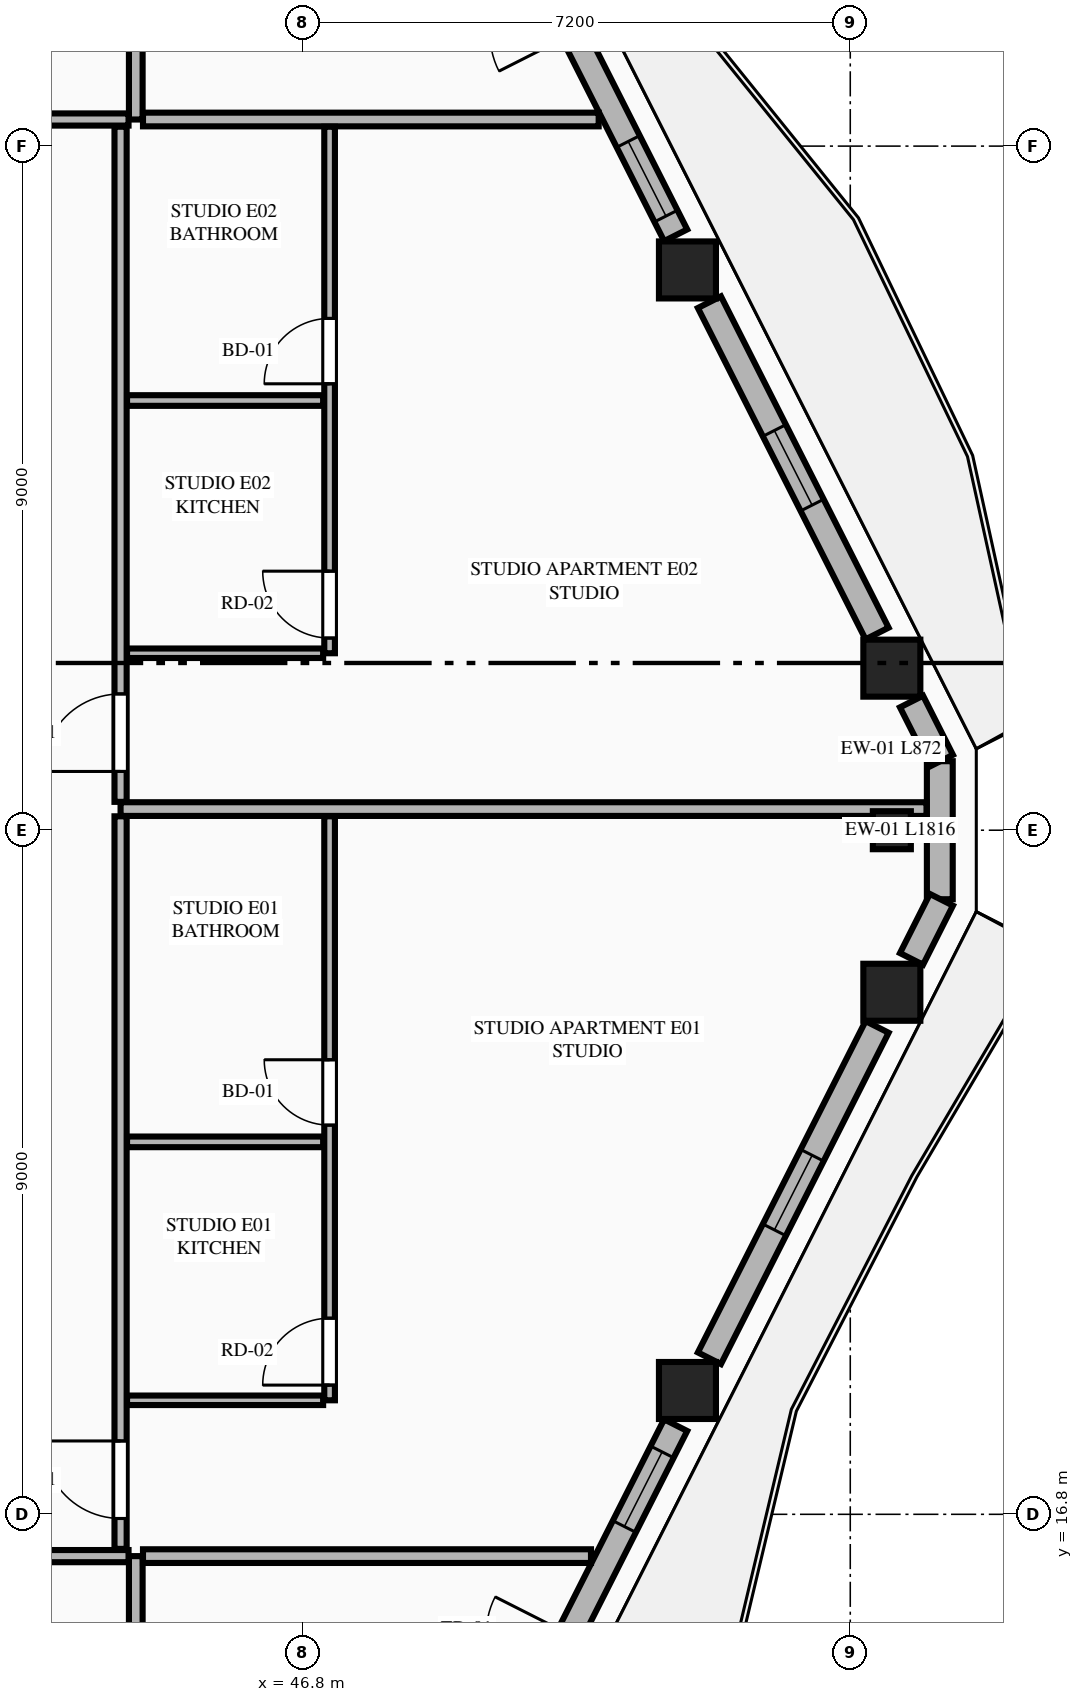
"""IFC4 building model, lengths in metres.
Left out: names, types, materials, properties, quantities, classifications, styles, units other than length and angle.
Written with IfcOpenShell. Run it as: python <this file> out.ifc"""

import sys

from ifc_helpers import new_model, si_unit, direction, frame, frame_2d, origin, origin_2d, place, context, subcontext, project, spatial, rectangle, extrude, element, fill, save


model = new_model("IFC4")
c1 = context("Model", 3, precision=1e-05, world=origin(), true_north=direction((0.0, 1.0)))
c2 = subcontext(c1, "Body", "Model", "MODEL_VIEW")
j1 = project(units=[si_unit("LENGTHUNIT", "METRE"), si_unit("PLANEANGLEUNIT", "RADIAN")], contexts=[c1])
p1 = place(None, origin())
s1 = spatial("IfcSite", under=j1, at=p1, CompositionType="ELEMENT")
p2 = place(p1, origin())
s2 = spatial("IfcBuilding", under=s1, at=p2, CompositionType="ELEMENT")
p3 = place(p2, frame((0.0, 0.0, 214.5)))
s3 = spatial("IfcBuildingStorey", under=s2, at=p3, CompositionType="ELEMENT", Elevation=214.5)
for number, where, z_axis, x_axis in (
    (1, (51.858, 18.429, 0.0), (0.0, 0.0, 1.0), (1.0, 0.0, 0.0)),
    (2, (54.547, 23.668, 0.0), (0.0, 0.0, 1.0), (1.0, 0.0, 0.0)),
    (3, (54.547, 27.932, 0.0), (0.0, 0.0, 1.0), (1.0, 0.0, 0.0)),
    (4, (51.858, 33.171, 0.0), (0.0, 0.0, 1.0), (1.0, 0.0, 0.0)),
):
    element("IfcColumn", number, at=place(p3, frame(where, z_axis=z_axis, x_axis=x_axis)), inside=s3, PredefinedType="COLUMN", context=c2, shape_type="SweptSolid", body=[
        extrude(rectangle(XDim=0.75, YDim=0.75, at=origin_2d()), origin(), (0.0, 0.0, 1.0), 3.55),
    ])
p4 = place(p3, frame((54.547, 25.8, 0.0), z_axis=(0.0, 0.0, 1.0), x_axis=(0.0, 1.0, 0.0)))
e5 = element("IfcColumn", 5, at=p4, inside=s3, PredefinedType="PILASTER", context=c2, shape_type="SweptSolid", body=[
    extrude(rectangle(XDim=0.5, YDim=0.35, at=origin_2d()), origin(), (0.0, 0.0, 1.0), 3.55),
])
p5 = place(p3, frame((55.178, 24.892, 0.0), z_axis=(0.0, 0.0, 1.0), x_axis=(0.0, 1.0, 0.0)))
e6 = element("IfcWall", 6, at=p5, inside=s3, PredefinedType="STANDARD", context=c2, shape_type="SweptSolid", body=[
    extrude(rectangle(XDim=1.816, YDim=0.34, at=frame_2d((0.908, 0.0))), origin(), (0.0, 0.0, 1.0), 3.35),
])
p6 = place(p3, frame((49.403, 13.427, 0.0), z_axis=(0.0, 0.0, 1.0), x_axis=(0.451425765525, 0.892308678777, 0.0)))
e7 = element("IfcWall", 7, at=p6, inside=s3, PredefinedType="STANDARD", context=c2, shape_type="SweptSolid", body=[
    extrude(rectangle(XDim=5.094, YDim=0.34, at=frame_2d((2.547, 0.0))), origin(), (0.0, 0.0, 1.0), 2.883),
])
p7 = place(p6, frame((0.907, 0.0, 0.0)))
e8 = element("IfcOpeningElement", 8, at=p7, cuts=e7, PredefinedType="OPENING", context=c2, shape_type="SweptSolid", body=[
    extrude(rectangle(XDim=1.1, YDim=2.25, at=frame_2d((0.55, 1.125))), frame((0.0, 0.18, 0.0), z_axis=(0.0, -1.0, 0.0), x_axis=(1.0, 0.0, 0.0)), (0.0, 0.0, 1.0), 0.36),
])
p8 = place(p6, frame((3.6, 0.0, 0.75)))
e9 = element("IfcOpeningElement", 9, at=p8, cuts=e7, PredefinedType="OPENING", context=c2, shape_type="SweptSolid", body=[
    extrude(rectangle(XDim=1.1, YDim=1.983, at=frame_2d((0.55, 0.991))), frame((0.0, 0.18, 0.0), z_axis=(0.0, -1.0, 0.0), x_axis=(1.0, 0.0, 0.0)), (0.0, 0.0, 1.0), 0.36),
])
p9 = place(p3, frame((52.147, 18.853, 0.0), z_axis=(0.0, 0.0, 1.0), x_axis=(0.451566029745, 0.892237704191, 0.0)))
e10 = element("IfcWall", 10, at=p9, inside=s3, PredefinedType="STANDARD", context=c2, shape_type="SweptSolid", body=[
    extrude(rectangle(XDim=4.885, YDim=0.34, at=frame_2d((2.443, 0.0))), origin(), (0.0, 0.0, 1.0), 2.883),
])
p10 = place(p9, frame((1.893, 0.0, 0.75)))
e11 = element("IfcOpeningElement", 11, at=p10, cuts=e10, PredefinedType="OPENING", context=c2, shape_type="SweptSolid", body=[
    extrude(rectangle(XDim=1.1, YDim=1.983, at=frame_2d((0.55, 0.991))), frame((0.0, 0.18, 0.0), z_axis=(0.0, -1.0, 0.0), x_axis=(1.0, 0.0, 0.0)), (0.0, 0.0, 1.0), 0.36),
])
p11 = place(p3, frame((54.806, 24.107, 0.0), z_axis=(0.0, 0.0, 1.0), x_axis=(0.450906649871, 0.892571113751, 0.0)))
e12 = element("IfcWall", 12, at=p11, inside=s3, PredefinedType="STANDARD", context=c2, shape_type="SweptSolid", body=[
    extrude(rectangle(XDim=0.872, YDim=0.34, at=frame_2d((0.436, 0.0))), origin(), (0.0, 0.0, 1.0), 3.35),
])
p12 = place(p3, frame((55.199, 26.715, 0.0), z_axis=(0.0, 0.0, 1.0), x_axis=(-0.451019391667, 0.892514150218, 0.0)))
e13 = element("IfcWall", 13, at=p12, inside=s3, PredefinedType="STANDARD", context=c2, shape_type="SweptSolid", body=[
    extrude(rectangle(XDim=0.872, YDim=0.34, at=frame_2d((0.436, 0.0))), origin(), (0.0, 0.0, 1.0), 3.35),
])
p13 = place(p3, frame((54.353, 28.388, 0.0), z_axis=(0.0, 0.0, 1.0), x_axis=(-0.451545895749, 0.892247893824, 0.0)))
e14 = element("IfcWall", 14, at=p13, inside=s3, PredefinedType="STANDARD", context=c2, shape_type="SweptSolid", body=[
    extrude(rectangle(XDim=4.885, YDim=0.34, at=frame_2d((2.443, 0.0))), origin(), (0.0, 0.0, 1.0), 2.883),
])
p14 = place(p13, frame((1.893, 0.0, 0.75)))
e15 = element("IfcOpeningElement", 15, at=p14, cuts=e14, PredefinedType="OPENING", context=c2, shape_type="SweptSolid", body=[
    extrude(rectangle(XDim=1.1, YDim=1.983, at=frame_2d((0.55, 0.991))), frame((0.0, 0.18, 0.0), z_axis=(0.0, -1.0, 0.0), x_axis=(1.0, 0.0, 0.0)), (0.0, 0.0, 1.0), 0.36),
])
p15 = place(p3, frame((51.703, 33.627, 0.0), z_axis=(0.0, 0.0, 1.0), x_axis=(-0.451406462707, 0.892318443957, 0.0)))
e16 = element("IfcWall", 16, at=p15, inside=s3, PredefinedType="STANDARD", context=c2, shape_type="SweptSolid", body=[
    extrude(rectangle(XDim=5.095, YDim=0.34, at=frame_2d((2.547, 0.0))), origin(), (0.0, 0.0, 1.0), 2.883),
])
p16 = place(p15, frame((2.976, 0.0, 0.0)))
e17 = element("IfcOpeningElement", 17, at=p16, cuts=e16, PredefinedType="OPENING", context=c2, shape_type="SweptSolid", body=[
    extrude(rectangle(XDim=1.1, YDim=2.25, at=frame_2d((0.55, 1.125))), frame((0.0, 0.18, 0.0), z_axis=(0.0, -1.0, 0.0), x_axis=(1.0, 0.0, 0.0)), (0.0, 0.0, 1.0), 0.36),
])
p17 = place(p15, frame((0.283, 0.0, 0.75)))
e18 = element("IfcOpeningElement", 18, at=p17, cuts=e16, PredefinedType="OPENING", context=c2, shape_type="SweptSolid", body=[
    extrude(rectangle(XDim=1.1, YDim=1.983, at=frame_2d((0.55, 0.991))), frame((0.0, 0.18, 0.0), z_axis=(0.0, -1.0, 0.0), x_axis=(1.0, 0.0, 0.0)), (0.0, 0.0, 1.0), 0.36),
])
p18 = place(p3, frame((44.6, 5.968, 0.0), z_axis=(0.0, 0.0, 1.0), x_axis=(0.0, 1.0, 0.0)))
e19 = element("IfcWall", 19, at=p18, inside=s3, PredefinedType="PARTITIONING", context=c2, shape_type="SweptSolid", body=[
    extrude(rectangle(XDim=10.282, YDim=0.18, at=frame_2d((5.141, 0.0))), origin(), (0.0, 0.0, 1.0), 3.35),
])
p19 = place(p3, frame((20.295, 16.25, 0.0), z_axis=(0.0, 0.0, 1.0), x_axis=(1.0, 0.0, 0.0)))
e20 = element("IfcWall", 20, at=p19, inside=s3, PredefinedType="PARTITIONING", context=c2, shape_type="SweptSolid", body=[
    extrude(rectangle(XDim=24.21, YDim=0.16, at=frame_2d((12.105, 0.0))), origin(), (0.0, 0.0, 1.0), 3.35),
])
p20 = place(p19, frame((0.705, 0.0, 0.0)))
e21 = element("IfcOpeningElement", 21, at=p20, cuts=e20, PredefinedType="OPENING", context=c2, shape_type="SweptSolid", body=[
    extrude(rectangle(XDim=1.02, YDim=2.25, at=frame_2d((0.51, 1.125))), frame((0.0, 0.09, 0.0), z_axis=(0.0, -1.0, 0.0), x_axis=(1.0, 0.0, 0.0)), (0.0, 0.0, 1.0), 0.18),
])
p21 = place(p3, frame((44.6, 35.15, 0.0), z_axis=(0.0, 0.0, 1.0), x_axis=(0.0, 1.0, 0.0)))
e22 = element("IfcWall", 22, at=p21, inside=s3, PredefinedType="PARTITIONING", context=c2, shape_type="SweptSolid", body=[
    extrude(rectangle(XDim=10.482, YDim=0.18, at=frame_2d((5.241, 0.0))), origin(), (0.0, 0.0, 1.0), 3.35),
])
p22 = place(p3, frame((20.295, 35.15, 0.0), z_axis=(0.0, 0.0, 1.0), x_axis=(1.0, 0.0, 0.0)))
e23 = element("IfcWall", 23, at=p22, inside=s3, PredefinedType="PARTITIONING", context=c2, shape_type="SweptSolid", body=[
    extrude(rectangle(XDim=24.21, YDim=0.16, at=frame_2d((12.105, 0.0))), origin(), (0.0, 0.0, 1.0), 3.35),
])
p23 = place(p22, frame((0.405, 0.0, 0.0)))
e24 = element("IfcOpeningElement", 24, at=p23, cuts=e23, PredefinedType="OPENING", context=c2, shape_type="SweptSolid", body=[
    extrude(rectangle(XDim=1.35, YDim=2.35, at=frame_2d((0.675, 1.175))), frame((0.0, 0.09, 0.0), z_axis=(0.0, -1.0, 0.0), x_axis=(1.0, 0.0, 0.0)), (0.0, 0.0, 1.0), 0.18),
])
p24 = place(p3, frame((44.695, 16.25, 0.0), z_axis=(0.0, 0.0, 1.0), x_axis=(1.0, 0.0, 0.0)))
e25 = element("IfcWall", 25, at=p24, inside=s3, PredefinedType="PARTITIONING", context=c2, shape_type="SweptSolid", body=[
    extrude(rectangle(XDim=5.894, YDim=0.18, at=frame_2d((2.947, 0.0))), origin(), (0.0, 0.0, 1.0), 3.35),
])
p25 = place(p3, frame((44.695, 35.15, 0.0), z_axis=(0.0, 0.0, 1.0), x_axis=(1.0, 0.0, 0.0)))
e26 = element("IfcWall", 26, at=p25, inside=s3, PredefinedType="PARTITIONING", context=c2, shape_type="SweptSolid", body=[
    extrude(rectangle(XDim=5.995, YDim=0.18, at=frame_2d((2.998, 0.0))), origin(), (0.0, 0.0, 1.0), 3.35),
])
p26 = place(p3, frame((44.4, 16.345, 0.0), z_axis=(0.0, 0.0, 1.0), x_axis=(0.0, 1.0, 0.0)))
e27 = element("IfcWall", 27, at=p26, inside=s3, PredefinedType="PARTITIONING", context=c2, shape_type="SweptSolid", body=[
    extrude(rectangle(XDim=9.638, YDim=0.16, at=frame_2d((4.819, 0.0))), origin(), (0.0, 0.0, 1.0), 3.35),
])
p27 = place(p26, frame((0.4, 0.0, 0.0)))
e28 = element("IfcOpeningElement", 28, at=p27, cuts=e27, PredefinedType="OPENING", context=c2, shape_type="SweptSolid", body=[
    extrude(rectangle(XDim=1.02, YDim=2.25, at=frame_2d((0.51, 1.125))), frame((0.0, 0.09, 0.0), z_axis=(0.0, -1.0, 0.0), x_axis=(1.0, 0.0, 0.0)), (0.0, 0.0, 1.0), 0.18),
])
p28 = place(p3, frame((44.485, 18.3, 0.0), z_axis=(0.0, 0.0, 1.0), x_axis=(1.0, 0.0, 0.0)))
e29 = element("IfcWall", 29, at=p28, inside=s3, PredefinedType="PARTITIONING", context=c2, shape_type="SweptSolid", body=[
    extrude(rectangle(XDim=2.58, YDim=0.125, at=frame_2d((1.29, 0.0))), origin(), (0.0, 0.0, 1.0), 2.807),
])
p29 = place(p3, frame((47.15, 18.3, 0.0), z_axis=(0.0, 0.0, 1.0), x_axis=(0.0, 1.0, 0.0)))
e30 = element("IfcWall", 30, at=p29, inside=s3, PredefinedType="PLUMBINGWALL", context=c2, shape_type="SweptSolid", body=[
    extrude(rectangle(XDim=7.683, YDim=0.14, at=frame_2d((3.841, 0.0))), origin(), (0.0, 0.0, 1.0), 3.35),
])
p30 = place(p29, frame((3.62, 0.0, 0.0)))
e31 = element("IfcOpeningElement", 31, at=p30, cuts=e30, PredefinedType="OPENING", context=c2, shape_type="SweptSolid", body=[
    extrude(rectangle(XDim=0.86, YDim=2.1, at=frame_2d((0.43, 1.05))), frame((0.0, 0.08, 0.0), z_axis=(0.0, -1.0, 0.0), x_axis=(1.0, 0.0, 0.0)), (0.0, 0.0, 1.0), 0.16),
])
p31 = place(p29, frame((0.2, 0.0, 0.0)))
e32 = element("IfcOpeningElement", 32, at=p31, cuts=e30, PredefinedType="OPENING", context=c2, shape_type="SweptSolid", body=[
    extrude(rectangle(XDim=0.88, YDim=2.15, at=frame_2d((0.44, 1.075))), frame((0.0, 0.08, 0.0), z_axis=(0.0, -1.0, 0.0), x_axis=(1.0, 0.0, 0.0)), (0.0, 0.0, 1.0), 0.16),
])
p32 = place(p3, frame((44.485, 21.7, 0.0), z_axis=(0.0, 0.0, 1.0), x_axis=(1.0, 0.0, 0.0)))
e33 = element("IfcWall", 33, at=p32, inside=s3, PredefinedType="PLUMBINGWALL", context=c2, shape_type="SweptSolid", body=[
    extrude(rectangle(XDim=2.58, YDim=0.14, at=frame_2d((1.29, 0.0))), origin(), (0.0, 0.0, 1.0), 3.35),
])
p33 = place(p3, frame((44.4, 26.078, 0.0), z_axis=(0.0, 0.0, 1.0), x_axis=(1.0, 0.0, 0.0)))
e34 = element("IfcWall", 34, at=p33, inside=s3, PredefinedType="PARTITIONING", context=c2, shape_type="SweptSolid", body=[
    extrude(rectangle(XDim=10.603, YDim=0.18, at=frame_2d((5.302, 0.0))), origin(), (0.0, 0.0, 1.0), 3.35),
])
p34 = place(p3, frame((44.4, 26.173, 0.0), z_axis=(0.0, 0.0, 1.0), x_axis=(0.0, 1.0, 0.0)))
e35 = element("IfcWall", 35, at=p34, inside=s3, PredefinedType="PARTITIONING", context=c2, shape_type="SweptSolid", body=[
    extrude(rectangle(XDim=8.882, YDim=0.16, at=frame_2d((4.441, 0.0))), origin(), (0.0, 0.0, 1.0), 3.35),
])
p35 = place(p34, frame((0.4, 0.0, 0.0)))
e36 = element("IfcOpeningElement", 36, at=p35, cuts=e35, PredefinedType="OPENING", context=c2, shape_type="SweptSolid", body=[
    extrude(rectangle(XDim=1.02, YDim=2.25, at=frame_2d((0.51, 1.125))), frame((0.0, 0.09, 0.0), z_axis=(0.0, -1.0, 0.0), x_axis=(1.0, 0.0, 0.0)), (0.0, 0.0, 1.0), 0.18),
])
p36 = place(p3, frame((44.485, 28.128, 0.0), z_axis=(0.0, 0.0, 1.0), x_axis=(1.0, 0.0, 0.0)))
e37 = element("IfcWall", 37, at=p36, inside=s3, PredefinedType="PARTITIONING", context=c2, shape_type="SweptSolid", body=[
    extrude(rectangle(XDim=2.58, YDim=0.125, at=frame_2d((1.29, 0.0))), origin(), (0.0, 0.0, 1.0), 3.35),
])
p37 = place(p3, frame((47.15, 28.128, 0.0), z_axis=(0.0, 0.0, 1.0), x_axis=(0.0, 1.0, 0.0)))
e38 = element("IfcWall", 38, at=p37, inside=s3, PredefinedType="PLUMBINGWALL", context=c2, shape_type="SweptSolid", body=[
    extrude(rectangle(XDim=6.927, YDim=0.14, at=frame_2d((3.463, 0.0))), origin(), (0.0, 0.0, 1.0), 3.35),
])
p38 = place(p37, frame((3.545, 0.0, 0.0)))
e39 = element("IfcOpeningElement", 39, at=p38, cuts=e38, PredefinedType="OPENING", context=c2, shape_type="SweptSolid", body=[
    extrude(rectangle(XDim=0.86, YDim=2.1, at=frame_2d((0.43, 1.05))), frame((0.0, 0.08, 0.0), z_axis=(0.0, -1.0, 0.0), x_axis=(1.0, 0.0, 0.0)), (0.0, 0.0, 1.0), 0.16),
])
p39 = place(p37, frame((0.2, 0.0, 0.0)))
e40 = element("IfcOpeningElement", 40, at=p39, cuts=e38, PredefinedType="OPENING", context=c2, shape_type="SweptSolid", body=[
    extrude(rectangle(XDim=0.88, YDim=2.15, at=frame_2d((0.44, 1.075))), frame((0.0, 0.08, 0.0), z_axis=(0.0, -1.0, 0.0), x_axis=(1.0, 0.0, 0.0)), (0.0, 0.0, 1.0), 0.16),
])
p40 = place(p3, frame((44.485, 31.453, 0.0), z_axis=(0.0, 0.0, 1.0), x_axis=(1.0, 0.0, 0.0)))
e41 = element("IfcWall", 41, at=p40, inside=s3, PredefinedType="PLUMBINGWALL", context=c2, shape_type="SweptSolid", body=[
    extrude(rectangle(XDim=2.58, YDim=0.14, at=frame_2d((1.29, 0.0))), origin(), (0.0, 0.0, 1.0), 3.35),
])
p41 = place(p10, origin())
e42 = element("IfcWindow", 42, at=p41, inside=s3, PartitioningType="SINGLE_PANEL", PredefinedType="WINDOW", context=c2, shape_type="SweptSolid", body=[
    extrude(rectangle(XDim=1.1, YDim=1.983, at=frame_2d((0.55, 0.991))), frame((0.0, 0.03, 0.0), z_axis=(0.0, -1.0, 0.0), x_axis=(1.0, 0.0, 0.0)), (0.0, 0.0, 1.0), 0.06),
])
fill(e11, e42)
p42 = place(p14, origin())
e43 = element("IfcWindow", 43, at=p42, inside=s3, PartitioningType="SINGLE_PANEL", PredefinedType="WINDOW", context=c2, shape_type="SweptSolid", body=[
    extrude(rectangle(XDim=1.1, YDim=1.983, at=frame_2d((0.55, 0.991))), frame((0.0, 0.03, 0.0), z_axis=(0.0, -1.0, 0.0), x_axis=(1.0, 0.0, 0.0)), (0.0, 0.0, 1.0), 0.06),
])
fill(e15, e43)
p43 = place(p30, origin())
e44 = element("IfcDoor", 44, at=p43, inside=s3, OperationType="SINGLE_SWING_RIGHT", PredefinedType="DOOR", context=c2, shape_type="SweptSolid", body=[
    extrude(rectangle(XDim=0.86, YDim=2.1, at=frame_2d((0.43, 1.05))), frame((0.0, 0.025, 0.0), z_axis=(0.0, -1.0, 0.0), x_axis=(1.0, 0.0, 0.0)), (0.0, 0.0, 1.0), 0.05),
])
fill(e31, e44)
p44 = place(p27, origin())
e45 = element("IfcDoor", 45, at=p44, inside=s3, OperationType="SINGLE_SWING_RIGHT", PredefinedType="DOOR", context=c2, shape_type="SweptSolid", body=[
    extrude(rectangle(XDim=1.02, YDim=2.25, at=frame_2d((0.51, 1.125))), frame((0.0, 0.025, 0.0), z_axis=(0.0, -1.0, 0.0), x_axis=(1.0, 0.0, 0.0)), (0.0, 0.0, 1.0), 0.05),
])
fill(e28, e45)
p45 = place(p31, origin())
e46 = element("IfcDoor", 46, at=p45, inside=s3, OperationType="SINGLE_SWING_LEFT", PredefinedType="DOOR", context=c2, shape_type="SweptSolid", body=[
    extrude(rectangle(XDim=0.88, YDim=2.15, at=frame_2d((0.44, 1.075))), frame((0.0, 0.025, 0.0), z_axis=(0.0, -1.0, 0.0), x_axis=(1.0, 0.0, 0.0)), (0.0, 0.0, 1.0), 0.05),
])
fill(e32, e46)
p46 = place(p38, origin())
e47 = element("IfcDoor", 47, at=p46, inside=s3, OperationType="SINGLE_SWING_LEFT", PredefinedType="DOOR", context=c2, shape_type="SweptSolid", body=[
    extrude(rectangle(XDim=0.86, YDim=2.1, at=frame_2d((0.43, 1.05))), frame((0.0, 0.025, 0.0), z_axis=(0.0, -1.0, 0.0), x_axis=(1.0, 0.0, 0.0)), (0.0, 0.0, 1.0), 0.05),
])
fill(e39, e47)
p47 = place(p35, origin())
e48 = element("IfcDoor", 48, at=p47, inside=s3, OperationType="SINGLE_SWING_LEFT", PredefinedType="DOOR", context=c2, shape_type="SweptSolid", body=[
    extrude(rectangle(XDim=1.02, YDim=2.25, at=frame_2d((0.51, 1.125))), frame((0.0, 0.025, 0.0), z_axis=(0.0, -1.0, 0.0), x_axis=(1.0, 0.0, 0.0)), (0.0, 0.0, 1.0), 0.05),
])
fill(e36, e48)
p48 = place(p39, origin())
e49 = element("IfcDoor", 49, at=p48, inside=s3, OperationType="SINGLE_SWING_RIGHT", PredefinedType="DOOR", context=c2, shape_type="SweptSolid", body=[
    extrude(rectangle(XDim=0.88, YDim=2.15, at=frame_2d((0.44, 1.075))), frame((0.0, 0.025, 0.0), z_axis=(0.0, -1.0, 0.0), x_axis=(1.0, 0.0, 0.0)), (0.0, 0.0, 1.0), 0.05),
])
fill(e40, e49)
p49 = place(p8, origin())
e50 = element("IfcWindow", 50, at=p49, inside=s3, PartitioningType="SINGLE_PANEL", PredefinedType="WINDOW", context=c2, shape_type="SweptSolid", body=[
    extrude(rectangle(XDim=1.1, YDim=1.983, at=frame_2d((0.55, 0.991))), frame((0.0, 0.03, 0.0), z_axis=(0.0, -1.0, 0.0), x_axis=(1.0, 0.0, 0.0)), (0.0, 0.0, 1.0), 0.06),
])
fill(e9, e50)
p50 = place(p17, origin())
e51 = element("IfcWindow", 51, at=p50, inside=s3, PartitioningType="SINGLE_PANEL", PredefinedType="WINDOW", context=c2, shape_type="SweptSolid", body=[
    extrude(rectangle(XDim=1.1, YDim=1.983, at=frame_2d((0.55, 0.991))), frame((0.0, 0.03, 0.0), z_axis=(0.0, -1.0, 0.0), x_axis=(1.0, 0.0, 0.0)), (0.0, 0.0, 1.0), 0.06),
])
fill(e18, e51)
save(model, sys.argv[1])
